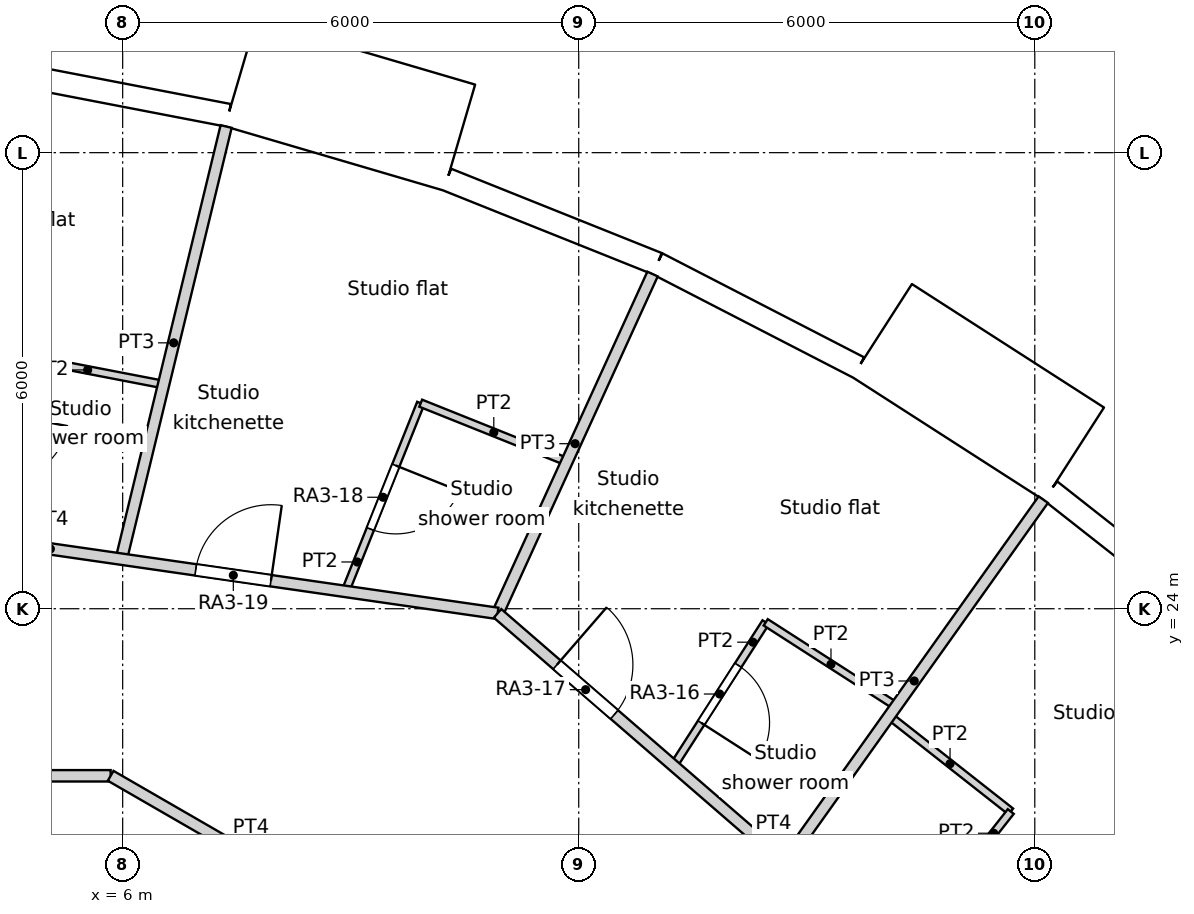
"""IFC4 building model, lengths in metres.
Left out: names, types, materials, properties, quantities, classifications, styles, units other than length and angle.
Written with IfcOpenShell. Run it as: python <this file> out.ifc"""

import sys

from ifc_helpers import new_model, si_unit, direction, frame, frame_2d, origin, origin_2d, place, context, subcontext, project, spatial, rectangle, circle, extrude, element, fill, save


model = new_model("IFC4")
c1 = context("Model", 3, precision=1e-05, world=origin(), true_north=direction((0.0, 1.0)))
c2 = subcontext(c1, "Body", "Model", "MODEL_VIEW")
j1 = project(units=[si_unit("LENGTHUNIT", "METRE"), si_unit("PLANEANGLEUNIT", "RADIAN")], contexts=[c1])
p1 = place(None, origin())
s1 = spatial("IfcSite", under=j1, at=p1, CompositionType="ELEMENT")
p2 = place(p1, origin())
s2 = spatial("IfcBuilding", under=s1, at=p2, CompositionType="ELEMENT")
p3 = place(p2, frame((0.0, 0.0, 49.8)))
s3 = spatial("IfcBuildingStorey", under=s2, at=p3, CompositionType="ELEMENT", Elevation=49.8)
for number, where, z_axis, x_axis in (
    (1, (17.561, 24.661, 0.0), (0.0, 0.0, 1.0), (1.0, 0.0, 0.0)),
    (2, (12.576, 27.539, 0.0), (0.0, 0.0, 1.0), (1.0, 0.0, 0.0)),
    (3, (7.137, 29.421, 0.0), (0.0, 0.0, 1.0), (1.0, 0.0, 0.0)),
):
    element("IfcColumn", number, at=place(p3, frame(where, z_axis=z_axis, x_axis=x_axis)), inside=s3, PredefinedType="COLUMN", context=c2, shape_type="SweptSolid", body=[
        extrude(circle(Radius=0.7, at=origin_2d()), origin(), (0.0, 0.0, 1.0), 3.6),
    ])
p4 = place(p3, frame((9.723, 22.54, 0.0), z_axis=(0.0, 0.0, 1.0), x_axis=(1.0, 0.0, 0.0)))
e4 = element("IfcColumn", 4, at=p4, inside=s3, PredefinedType="COLUMN", context=c2, shape_type="SweptSolid", body=[
    extrude(circle(Radius=0.75, at=origin_2d()), origin(), (0.0, 0.0, 1.0), 3.6),
])
p5 = place(p3, frame((20.546, 23.711, 0.0), z_axis=(0.0, 0.0, 1.0), x_axis=(-0.786045331304, 0.618168858108, 0.0)))
e5 = element("IfcWall", 5, at=p5, inside=s3, PredefinedType="SOLIDWALL", context=c2, shape_type="SweptSolid", body=[
    extrude(rectangle(XDim=2.98, YDim=0.3, at=frame_2d((1.49, 0.0))), origin(), (0.0, 0.0, 1.0), 3.15),
])
p6 = place(p5, frame((1.49, 0.0, 1.55)))
e6 = element("IfcOpeningElement", 6, at=p6, cuts=e5, PredefinedType="OPENING", context=c2, shape_type="SweptSolid", body=[
    extrude(circle(Radius=0.9, at=origin_2d()), frame((0.0, 0.16, 0.0), z_axis=(0.0, -1.0, 0.0), x_axis=(1.0, 0.0, 0.0)), (0.0, 0.0, 1.0), 0.32),
])
p7 = place(p3, frame((18.516, 26.037, -0.45), z_axis=(0.0, 0.0, 1.0), x_axis=(-0.841223422347, 0.540687667415, 0.0)))
e7 = element("IfcWall", 7, at=p7, inside=s3, PredefinedType="ELEMENTEDWALL", context=c2, shape_type="SweptSolid", body=[
    extrude(rectangle(XDim=3.0, YDim=1.45, at=frame_2d((1.5, 0.0))), origin(), (0.0, 0.0, 1.0), 3.6),
])
p8 = place(p7, frame((1.5, 0.0, 2.0)))
e8 = element("IfcOpeningElement", 8, at=p8, cuts=e7, PredefinedType="OPENING", context=c2, shape_type="SweptSolid", body=[
    extrude(circle(Radius=0.9, at=origin_2d()), frame((0.0, 0.735, 0.0), z_axis=(0.0, -1.0, 0.0), x_axis=(1.0, 0.0, 0.0)), (0.0, 0.0, 1.0), 1.47),
])
p9 = place(p3, frame((15.682, 27.174, 0.0), z_axis=(0.0, 0.0, 1.0), x_axis=(-0.888819853856, 0.458256770153, 0.0)))
e9 = element("IfcWall", 9, at=p9, inside=s3, PredefinedType="SOLIDWALL", context=c2, shape_type="SweptSolid", body=[
    extrude(rectangle(XDim=2.98, YDim=0.3, at=frame_2d((1.49, 0.0))), origin(), (0.0, 0.0, 1.0), 3.15),
])
p10 = place(p9, frame((1.49, 0.0, 1.55)))
e10 = element("IfcOpeningElement", 10, at=p10, cuts=e9, PredefinedType="OPENING", context=c2, shape_type="SweptSolid", body=[
    extrude(circle(Radius=0.9, at=origin_2d()), frame((0.0, 0.16, 0.0), z_axis=(0.0, -1.0, 0.0), x_axis=(1.0, 0.0, 0.0)), (0.0, 0.0, 1.0), 0.32),
])
p11 = place(p3, frame((13.033, 28.539, 0.0), z_axis=(0.0, 0.0, 1.0), x_axis=(-0.928403213937, 0.371574316054, 0.0)))
e11 = element("IfcWall", 11, at=p11, inside=s3, PredefinedType="SOLIDWALL", context=c2, shape_type="SweptSolid", body=[
    extrude(rectangle(XDim=2.98, YDim=0.3, at=frame_2d((1.49, 0.0))), origin(), (0.0, 0.0, 1.0), 3.15),
])
p12 = place(p11, frame((1.49, 0.0, 1.55)))
e12 = element("IfcOpeningElement", 12, at=p12, cuts=e11, PredefinedType="OPENING", context=c2, shape_type="SweptSolid", body=[
    extrude(circle(Radius=0.9, at=origin_2d()), frame((0.0, 0.16, 0.0), z_axis=(0.0, -1.0, 0.0), x_axis=(1.0, 0.0, 0.0)), (0.0, 0.0, 1.0), 0.32),
])
p13 = place(p3, frame((10.43, 30.198, -0.45), z_axis=(0.0, 0.0, 1.0), x_axis=(-0.959489813418, 0.281743319258, 0.0)))
e13 = element("IfcWall", 13, at=p13, inside=s3, PredefinedType="ELEMENTEDWALL", context=c2, shape_type="SweptSolid", body=[
    extrude(rectangle(XDim=3.0, YDim=1.45, at=frame_2d((1.5, 0.0))), origin(), (0.0, 0.0, 1.0), 3.6),
])
p14 = place(p13, frame((1.5, 0.0, 2.0)))
e14 = element("IfcOpeningElement", 14, at=p14, cuts=e13, PredefinedType="OPENING", context=c2, shape_type="SweptSolid", body=[
    extrude(circle(Radius=0.9, at=origin_2d()), frame((0.0, 0.735, 0.0), z_axis=(0.0, -1.0, 0.0), x_axis=(1.0, 0.0, 0.0)), (0.0, 0.0, 1.0), 1.47),
])
p15 = place(p3, frame((7.391, 30.491, 0.0), z_axis=(0.0, 0.0, 1.0), x_axis=(-0.981924535406, 0.189272836848, 0.0)))
e15 = element("IfcWall", 15, at=p15, inside=s3, PredefinedType="SOLIDWALL", context=c2, shape_type="SweptSolid", body=[
    extrude(rectangle(XDim=2.98, YDim=0.3, at=frame_2d((1.49, 0.0))), origin(), (0.0, 0.0, 1.0), 3.15),
])
p16 = place(p15, frame((1.49, 0.0, 1.55)))
e16 = element("IfcOpeningElement", 16, at=p16, cuts=e15, PredefinedType="OPENING", context=c2, shape_type="SweptSolid", body=[
    extrude(circle(Radius=0.9, at=origin_2d()), frame((0.0, 0.16, 0.0), z_axis=(0.0, -1.0, 0.0), x_axis=(1.0, 0.0, 0.0)), (0.0, 0.0, 1.0), 0.32),
])
p17 = place(p3, frame((10.932, 23.939, 0.0), z_axis=(0.0, 0.0, 1.0), x_axis=(0.755838982892, -0.654757536757, 0.0)))
e17 = element("IfcWall", 17, at=p17, inside=s3, PredefinedType="PARTITIONING", context=c2, shape_type="SweptSolid", body=[
    extrude(rectangle(XDim=14.83, YDim=0.15, at=frame_2d((7.415, 0.0))), origin(), (0.0, 0.0, 1.0), 3.15),
])
p18 = place(p17, frame((12.796, 0.0, 0.0)))
e18 = element("IfcOpeningElement", 18, at=p18, cuts=e17, PredefinedType="OPENING", context=c2, shape_type="SweptSolid", body=[
    extrude(rectangle(XDim=1.0, YDim=2.1, at=frame_2d((0.5, 1.05))), frame((0.0, 0.075, 0.0), z_axis=(0.0, -1.0, 0.0), x_axis=(1.0, 0.0, 0.0)), (0.0, 0.0, 1.0), 0.15),
])
p19 = place(p17, frame((7.572, 0.0, 0.0)))
e19 = element("IfcOpeningElement", 19, at=p19, cuts=e17, PredefinedType="OPENING", context=c2, shape_type="SweptSolid", body=[
    extrude(rectangle(XDim=1.0, YDim=2.1, at=frame_2d((0.5, 1.05))), frame((0.0, 0.075, 0.0), z_axis=(0.0, -1.0, 0.0), x_axis=(1.0, 0.0, 0.0)), (0.0, 0.0, 1.0), 0.15),
])
p20 = place(p17, frame((1.033, 0.0, 0.0)))
e20 = element("IfcOpeningElement", 20, at=p20, cuts=e17, PredefinedType="OPENING", context=c2, shape_type="SweptSolid", body=[
    extrude(rectangle(XDim=1.0, YDim=2.1, at=frame_2d((0.5, 1.05))), frame((0.0, 0.075, 0.0), z_axis=(0.0, -1.0, 0.0), x_axis=(1.0, 0.0, 0.0)), (0.0, 0.0, 1.0), 0.15),
])
p21 = place(p3, frame((5.842, 21.802, 0.0), z_axis=(0.0, 0.0, 1.0), x_axis=(0.865983505205, -0.500072563448, 0.0)))
e21 = element("IfcWall", 21, at=p21, inside=s3, PredefinedType="PARTITIONING", context=c2, shape_type="SweptSolid", body=[
    extrude(rectangle(XDim=4.265, YDim=0.15, at=frame_2d((2.133, 0.0))), origin(), (0.0, 0.0, 1.0), 3.15),
])
p22 = place(p3, frame((0.608, 21.802, 0.0), z_axis=(0.0, 0.0, 1.0), x_axis=(1.0, 0.0, 0.0)))
e22 = element("IfcWall", 22, at=p22, inside=s3, PredefinedType="PARTITIONING", context=c2, shape_type="SweptSolid", body=[
    extrude(rectangle(XDim=5.234, YDim=0.15, at=frame_2d((2.617, 0.0))), origin(), (0.0, 0.0, 1.0), 3.15),
])
p23 = place(p3, frame((-3.746, 26.054, 0.0), z_axis=(0.0, 0.0, 1.0), x_axis=(0.989780545379, -0.142598990138, 0.0)))
e23 = element("IfcWall", 23, at=p23, inside=s3, PredefinedType="PARTITIONING", context=c2, shape_type="SweptSolid", body=[
    extrude(rectangle(XDim=14.83, YDim=0.15, at=frame_2d((7.415, 0.0))), origin(), (0.0, 0.0, 1.0), 3.15),
])
p24 = place(p23, frame((10.817, 0.0, 0.0)))
e24 = element("IfcOpeningElement", 24, at=p24, cuts=e23, PredefinedType="OPENING", context=c2, shape_type="SweptSolid", body=[
    extrude(rectangle(XDim=1.0, YDim=2.1, at=frame_2d((0.5, 1.05))), frame((0.0, 0.075, 0.0), z_axis=(0.0, -1.0, 0.0), x_axis=(1.0, 0.0, 0.0)), (0.0, 0.0, 1.0), 0.15),
])
p25 = place(p23, frame((5.954, 0.0, 0.0)))
e25 = element("IfcOpeningElement", 25, at=p25, cuts=e23, PredefinedType="OPENING", context=c2, shape_type="SweptSolid", body=[
    extrude(rectangle(XDim=1.0, YDim=2.1, at=frame_2d((0.5, 1.05))), frame((0.0, 0.075, 0.0), z_axis=(0.0, -1.0, 0.0), x_axis=(1.0, 0.0, 0.0)), (0.0, 0.0, 1.0), 0.15),
])
p26 = place(p23, frame((3.314, 0.0, 0.0)))
e26 = element("IfcOpeningElement", 26, at=p26, cuts=e23, PredefinedType="OPENING", context=c2, shape_type="SweptSolid", body=[
    extrude(rectangle(XDim=1.0, YDim=2.1, at=frame_2d((0.5, 1.05))), frame((0.0, 0.075, 0.0), z_axis=(0.0, -1.0, 0.0), x_axis=(1.0, 0.0, 0.0)), (0.0, 0.0, 1.0), 0.15),
])
p27 = place(p3, frame((18.36, 17.505, 0.0), z_axis=(0.0, 0.0, 1.0), x_axis=(0.723605349213, 0.690213951315, 0.0)))
e27 = element("IfcWall", 27, at=p27, inside=s3, PredefinedType="PARTITIONING", context=c2, shape_type="SweptSolid", body=[
    extrude(rectangle(XDim=5.856, YDim=0.15, at=frame_2d((2.928, 0.0))), origin(), (0.0, 0.0, 1.0), 3.15),
])
p28 = place(p3, frame((16.168, 19.404, 0.0), z_axis=(0.0, 0.0, 1.0), x_axis=(0.618142414415, 0.786066126672, 0.0)))
e28 = element("IfcWall", 28, at=p28, inside=s3, PredefinedType="PARTITIONING", context=c2, shape_type="SweptSolid", body=[
    extrude(rectangle(XDim=2.453, YDim=0.1, at=frame_2d((1.226, 0.0))), origin(), (0.0, 0.0, 1.0), 3.15),
])
p29 = place(p28, frame((0.776, 0.0, 0.0)))
e29 = element("IfcOpeningElement", 29, at=p29, cuts=e28, PredefinedType="OPENING", context=c2, shape_type="SweptSolid", body=[
    extrude(rectangle(XDim=0.9, YDim=2.04, at=frame_2d((0.45, 1.02))), frame((0.0, 0.05, 0.0), z_axis=(0.0, -1.0, 0.0), x_axis=(1.0, 0.0, 0.0)), (0.0, 0.0, 1.0), 0.1),
])
p30 = place(p3, frame((16.086, 22.589, 0.0), z_axis=(0.0, 0.0, 1.0), x_axis=(0.785984904201, -0.618245687707, 0.0)))
e30 = element("IfcWall", 30, at=p30, inside=s3, PredefinedType="PARTITIONING", context=c2, shape_type="SweptSolid", body=[
    extrude(rectangle(XDim=2.033, YDim=0.1, at=frame_2d((1.017, 0.0))), origin(), (0.0, 0.0, 1.0), 3.15),
])
p31 = place(p3, frame((14.715, 20.664, 0.0), z_axis=(0.0, 0.0, 1.0), x_axis=(0.57995989616, 0.814645026282, 0.0)))
e31 = element("IfcWall", 31, at=p31, inside=s3, PredefinedType="PARTITIONING", context=c2, shape_type="SweptSolid", body=[
    extrude(rectangle(XDim=5.857, YDim=0.15, at=frame_2d((2.928, 0.0))), origin(), (0.0, 0.0, 1.0), 3.15),
])
p32 = place(p3, frame((14.46, 23.821, 0.0), z_axis=(0.0, 0.0, 1.0), x_axis=(0.841135728185, -0.540824081168, 0.0)))
e32 = element("IfcWall", 32, at=p32, inside=s3, PredefinedType="PARTITIONING", context=c2, shape_type="SweptSolid", body=[
    extrude(rectangle(XDim=2.041, YDim=0.1, at=frame_2d((1.021, 0.0))), origin(), (0.0, 0.0, 1.0), 3.15),
])
p33 = place(p3, frame((13.248, 21.935, 0.0), z_axis=(0.0, 0.0, 1.0), x_axis=(0.540597960994, 0.841281073464, 0.0)))
e33 = element("IfcWall", 33, at=p33, inside=s3, PredefinedType="PARTITIONING", context=c2, shape_type="SweptSolid", body=[
    extrude(rectangle(XDim=2.242, YDim=0.1, at=frame_2d((1.121, 0.0))), origin(), (0.0, 0.0, 1.0), 3.15),
])
p34 = place(p33, frame((0.671, 0.0, 0.0)))
e34 = element("IfcOpeningElement", 34, at=p34, cuts=e33, PredefinedType="OPENING", context=c2, shape_type="SweptSolid", body=[
    extrude(rectangle(XDim=0.9, YDim=2.04, at=frame_2d((0.45, 1.02))), frame((0.0, 0.05, 0.0), z_axis=(0.0, -1.0, 0.0), x_axis=(1.0, 0.0, 0.0)), (0.0, 0.0, 1.0), 0.1),
])
p35 = place(p3, frame((10.934, 23.939, 0.0), z_axis=(0.0, 0.0, 1.0), x_axis=(0.415144641481, 0.909755421336, 0.0)))
e35 = element("IfcWall", 35, at=p35, inside=s3, PredefinedType="PARTITIONING", context=c2, shape_type="SweptSolid", body=[
    extrude(rectangle(XDim=4.906, YDim=0.15, at=frame_2d((2.453, 0.0))), origin(), (0.0, 0.0, 1.0), 3.15),
])
p36 = place(p3, frame((9.921, 26.704, 0.0), z_axis=(0.0, 0.0, 1.0), x_axis=(0.928346586681, -0.37171577179, 0.0)))
e36 = element("IfcWall", 36, at=p36, inside=s3, PredefinedType="PARTITIONING", context=c2, shape_type="SweptSolid", body=[
    extrude(rectangle(XDim=2.072, YDim=0.1, at=frame_2d((1.036, 0.0))), origin(), (0.0, 0.0, 1.0), 3.15),
])
p37 = place(p3, frame((8.93, 24.228, 0.0), z_axis=(0.0, 0.0, 1.0), x_axis=(0.371564281805, 0.928407229876, 0.0)))
e37 = element("IfcWall", 37, at=p37, inside=s3, PredefinedType="PARTITIONING", context=c2, shape_type="SweptSolid", body=[
    extrude(rectangle(XDim=2.667, YDim=0.1, at=frame_2d((1.333, 0.0))), origin(), (0.0, 0.0, 1.0), 3.15),
])
p38 = place(p37, frame((0.884, 0.0, 0.0)))
e38 = element("IfcOpeningElement", 38, at=p38, cuts=e37, PredefinedType="OPENING", context=c2, shape_type="SweptSolid", body=[
    extrude(rectangle(XDim=0.9, YDim=2.04, at=frame_2d((0.45, 1.02))), frame((0.0, 0.05, 0.0), z_axis=(0.0, -1.0, 0.0), x_axis=(1.0, 0.0, 0.0)), (0.0, 0.0, 1.0), 0.1),
])
p39 = place(p3, frame((5.981, 24.652, 0.0), z_axis=(0.0, 0.0, 1.0), x_axis=(0.235555883074, 0.971860805851, 0.0)))
e39 = element("IfcWall", 39, at=p39, inside=s3, PredefinedType="PARTITIONING", context=c2, shape_type="SweptSolid", body=[
    extrude(rectangle(XDim=5.857, YDim=0.15, at=frame_2d((2.928, 0.0))), origin(), (0.0, 0.0, 1.0), 3.15),
])
p40 = place(p3, frame((4.541, 27.334, 0.0), z_axis=(0.0, 0.0, 1.0), x_axis=(0.981919009751, -0.189301501024, 0.0)))
e40 = element("IfcWall", 40, at=p40, inside=s3, PredefinedType="PARTITIONING", context=c2, shape_type="SweptSolid", body=[
    extrude(rectangle(XDim=2.034, YDim=0.1, at=frame_2d((1.017, 0.0))), origin(), (0.0, 0.0, 1.0), 3.15),
])
p41 = place(p6, origin())
e41 = element("IfcWindow", 41, at=p41, inside=s3, PartitioningType="SINGLE_PANEL", PredefinedType="WINDOW", context=c2, shape_type="SweptSolid", body=[
    extrude(circle(Radius=0.9, at=origin_2d()), frame((0.0, 0.12, 0.0), z_axis=(0.0, -1.0, 0.0), x_axis=(1.0, 0.0, 0.0)), (0.0, 0.0, 1.0), 0.1),
])
fill(e6, e41)
p42 = place(p8, origin())
e42 = element("IfcWindow", 42, at=p42, inside=s3, PartitioningType="SINGLE_PANEL", PredefinedType="WINDOW", context=c2, shape_type="SweptSolid", body=[
    extrude(circle(Radius=0.9, at=origin_2d()), frame((0.0, 0.695, 0.0), z_axis=(0.0, -1.0, 0.0), x_axis=(1.0, 0.0, 0.0)), (0.0, 0.0, 1.0), 0.1),
])
fill(e8, e42)
p43 = place(p10, origin())
e43 = element("IfcWindow", 43, at=p43, inside=s3, PartitioningType="SINGLE_PANEL", PredefinedType="WINDOW", context=c2, shape_type="SweptSolid", body=[
    extrude(circle(Radius=0.9, at=origin_2d()), frame((0.0, 0.12, 0.0), z_axis=(0.0, -1.0, 0.0), x_axis=(1.0, 0.0, 0.0)), (0.0, 0.0, 1.0), 0.1),
])
fill(e10, e43)
p44 = place(p12, origin())
e44 = element("IfcWindow", 44, at=p44, inside=s3, PartitioningType="SINGLE_PANEL", PredefinedType="WINDOW", context=c2, shape_type="SweptSolid", body=[
    extrude(circle(Radius=0.9, at=origin_2d()), frame((0.0, 0.12, 0.0), z_axis=(0.0, -1.0, 0.0), x_axis=(1.0, 0.0, 0.0)), (0.0, 0.0, 1.0), 0.1),
])
fill(e12, e44)
p45 = place(p14, origin())
e45 = element("IfcWindow", 45, at=p45, inside=s3, PartitioningType="SINGLE_PANEL", PredefinedType="WINDOW", context=c2, shape_type="SweptSolid", body=[
    extrude(circle(Radius=0.9, at=origin_2d()), frame((0.0, 0.695, 0.0), z_axis=(0.0, -1.0, 0.0), x_axis=(1.0, 0.0, 0.0)), (0.0, 0.0, 1.0), 0.1),
])
fill(e14, e45)
p46 = place(p16, origin())
e46 = element("IfcWindow", 46, at=p46, inside=s3, PartitioningType="SINGLE_PANEL", PredefinedType="WINDOW", context=c2, shape_type="SweptSolid", body=[
    extrude(circle(Radius=0.9, at=origin_2d()), frame((0.0, 0.12, 0.0), z_axis=(0.0, -1.0, 0.0), x_axis=(1.0, 0.0, 0.0)), (0.0, 0.0, 1.0), 0.1),
])
fill(e16, e46)
p47 = place(p34, origin())
e47 = element("IfcDoor", 47, at=p47, inside=s3, OperationType="SINGLE_SWING_RIGHT", PredefinedType="DOOR", context=c2, shape_type="SweptSolid", body=[
    extrude(rectangle(XDim=0.9, YDim=2.04, at=frame_2d((0.45, 1.02))), frame((0.0, 0.025, 0.0), z_axis=(0.0, -1.0, 0.0), x_axis=(1.0, 0.0, 0.0)), (0.0, 0.0, 1.0), 0.05),
])
fill(e34, e47)
p48 = place(p20, origin())
e48 = element("IfcDoor", 48, at=p48, inside=s3, OperationType="SINGLE_SWING_LEFT", PredefinedType="DOOR", context=c2, shape_type="SweptSolid", body=[
    extrude(rectangle(XDim=1.0, YDim=2.1, at=frame_2d((0.5, 1.05))), frame((0.0, 0.025, 0.0), z_axis=(0.0, -1.0, 0.0), x_axis=(1.0, 0.0, 0.0)), (0.0, 0.0, 1.0), 0.05),
])
fill(e20, e48)
p49 = place(p38, origin())
e49 = element("IfcDoor", 49, at=p49, inside=s3, OperationType="SINGLE_SWING_LEFT", PredefinedType="DOOR", context=c2, shape_type="SweptSolid", body=[
    extrude(rectangle(XDim=0.9, YDim=2.04, at=frame_2d((0.45, 1.02))), frame((0.0, 0.025, 0.0), z_axis=(0.0, -1.0, 0.0), x_axis=(1.0, 0.0, 0.0)), (0.0, 0.0, 1.0), 0.05),
])
fill(e38, e49)
p50 = place(p24, origin())
e50 = element("IfcDoor", 50, at=p50, inside=s3, OperationType="SINGLE_SWING_RIGHT", PredefinedType="DOOR", context=c2, shape_type="SweptSolid", body=[
    extrude(rectangle(XDim=1.0, YDim=2.1, at=frame_2d((0.5, 1.05))), frame((0.0, 0.025, 0.0), z_axis=(0.0, -1.0, 0.0), x_axis=(1.0, 0.0, 0.0)), (0.0, 0.0, 1.0), 0.05),
])
fill(e24, e50)
save(model, sys.argv[1])
